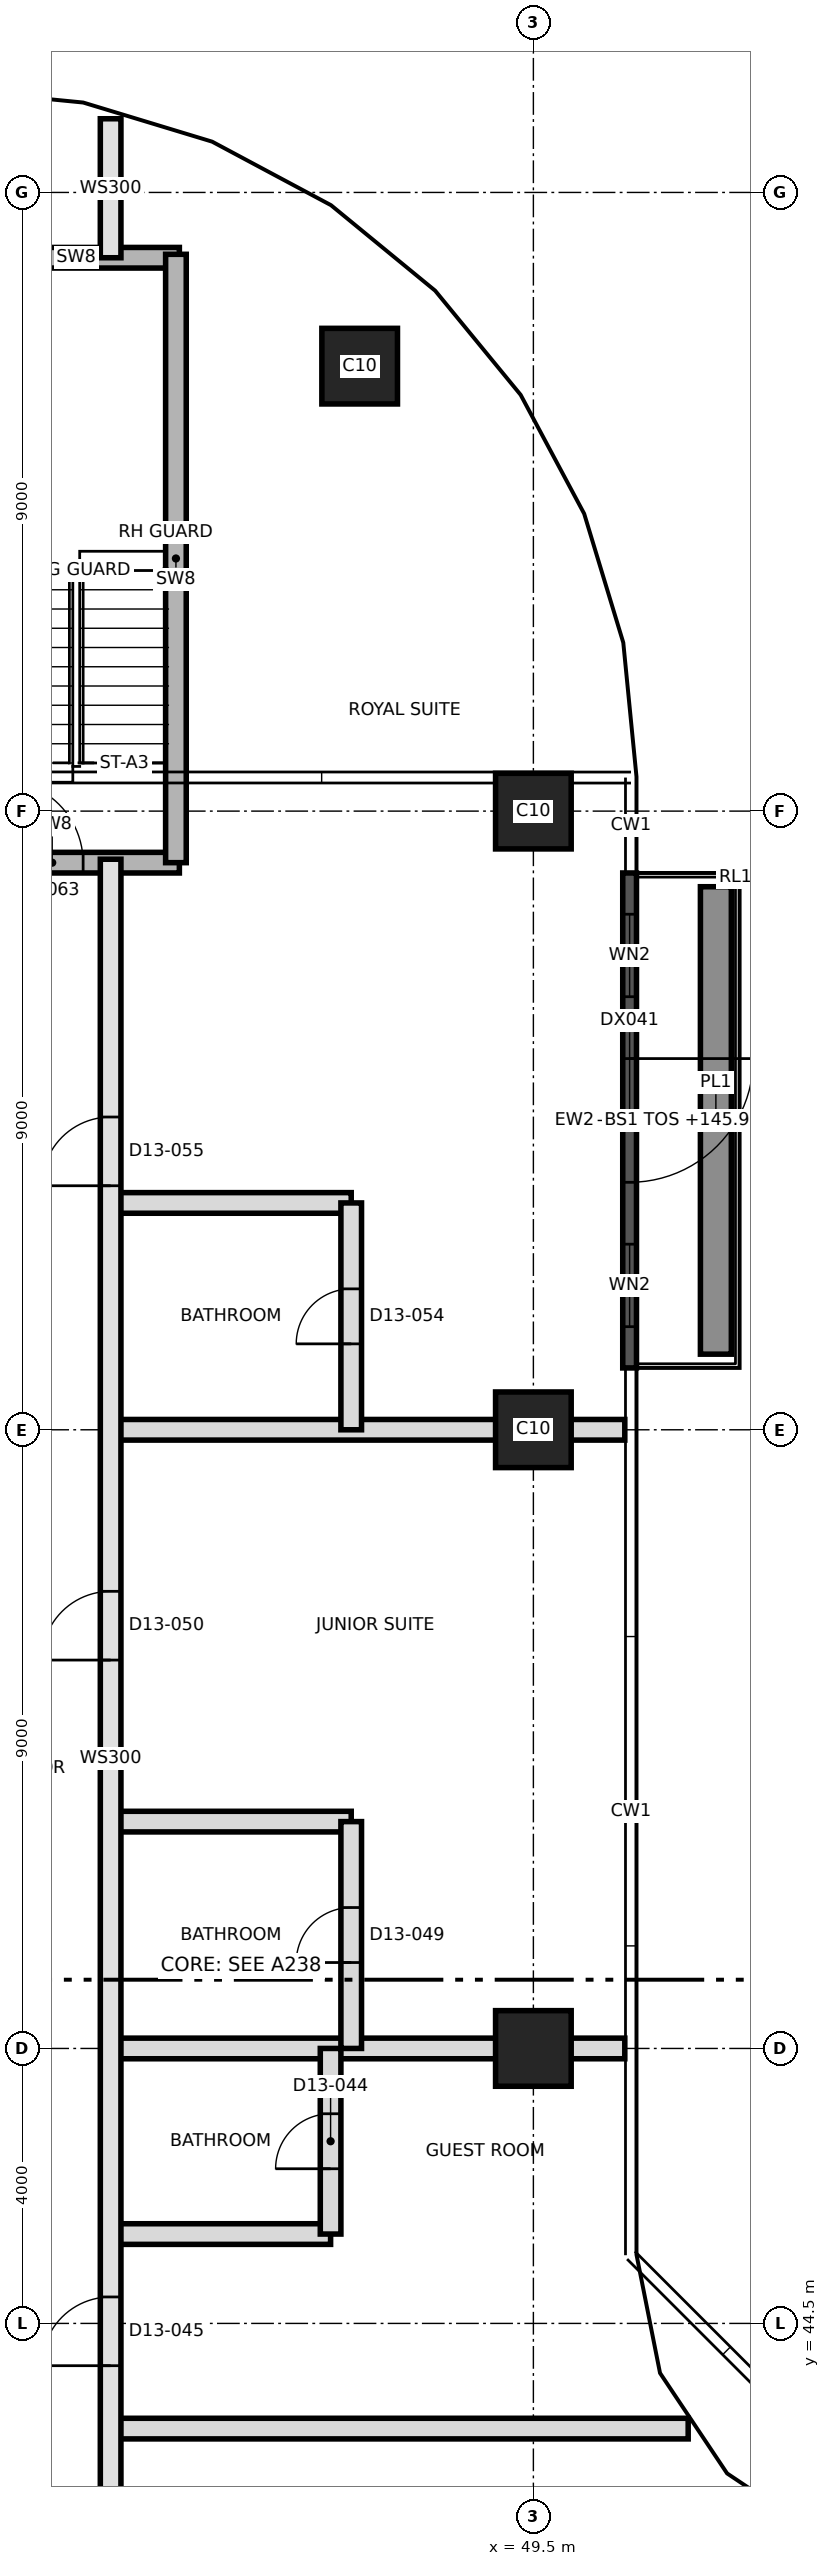
"""IFC4 building model, lengths in metres.
Left out: names, types, materials, properties, quantities, classifications, styles, units other than length and angle.
Written with IfcOpenShell. Run it as: python <this file> out.ifc"""

import sys

from ifc_helpers import new_model, si_unit, direction, frame, frame_2d, origin, origin_2d, place, context, subcontext, project, spatial, rectangle, extrude, element, fill, save


model = new_model("IFC4")
c1 = context("Model", 3, precision=1e-05, world=origin(), true_north=direction((0.0, 1.0)))
c2 = subcontext(c1, "Body", "Model", "MODEL_VIEW")
j1 = project(units=[si_unit("LENGTHUNIT", "METRE"), si_unit("PLANEANGLEUNIT", "RADIAN")], contexts=[c1])
p1 = place(None, origin())
s1 = spatial("IfcSite", under=j1, at=p1, CompositionType="ELEMENT")
p2 = place(p1, origin())
s2 = spatial("IfcBuilding", under=s1, at=p2, CompositionType="ELEMENT")
p3 = place(p2, frame((0.0, 0.0, 145.9)))
s3 = spatial("IfcBuildingStorey", under=s2, at=p3, CompositionType="ELEMENT", Elevation=145.9)
for number, where, z_axis, x_axis in (
    (1, (49.5, 48.5, 0.0), (0.0, 0.0, 1.0), (1.0, 0.0, 0.0)),
    (2, (49.5, 57.5, 0.0), (0.0, 0.0, 1.0), (1.0, 0.0, 0.0)),
    (3, (49.5, 66.5, 0.0), (0.0, 0.0, 1.0), (1.0, 0.0, 0.0)),
    (4, (46.973, 72.973, 0.0), (0.0, 0.0, 1.0), (1.0, 0.0, 0.0)),
):
    element("IfcColumn", number, at=place(p3, frame(where, z_axis=z_axis, x_axis=x_axis)), inside=s3, PredefinedType="COLUMN", context=c2, shape_type="SweptSolid", body=[
        extrude(rectangle(XDim=1.1, YDim=1.1, at=origin_2d()), origin(), (0.0, 0.0, 1.0), 3.7),
    ])
p4 = place(p3, frame((52.155, 62.0, 0.0), z_axis=(0.0, 0.0, 1.0), x_axis=(1.0, 0.0, 0.0)))
e5 = element("IfcWall", 5, at=p4, inside=s3, PredefinedType="SOLIDWALL", context=c2, shape_type="SweptSolid", body=[
    extrude(rectangle(XDim=0.45, YDim=6.8, at=origin_2d()), origin(), (0.0, 0.0, 1.0), 1.0),
])
p5 = place(p3, frame((50.9, 65.6, 0.0), z_axis=(0.0, 0.0, 1.0), x_axis=(0.0, -1.0, 0.0)))
e6 = element("IfcWall", 6, at=p5, inside=s3, PredefinedType="SOLIDWALL", context=c2, shape_type="SweptSolid", body=[
    extrude(rectangle(XDim=7.2, YDim=0.2, at=frame_2d((3.6, 0.0))), origin(), (0.0, 0.0, 1.0), 3.4),
])
p6 = place(p5, frame((2.7, 0.0, 0.0)))
e7 = element("IfcOpeningElement", 7, at=p6, cuts=e6, PredefinedType="OPENING", context=c2, shape_type="SweptSolid", body=[
    extrude(rectangle(XDim=1.8, YDim=2.4, at=frame_2d((0.9, 1.2))), frame((0.0, 0.11, 0.0), z_axis=(0.0, -1.0, 0.0), x_axis=(1.0, 0.0, 0.0)), (0.0, 0.0, 1.0), 0.22),
])
p7 = place(p5, frame((5.4, 0.0, 0.9)))
e8 = element("IfcOpeningElement", 8, at=p7, cuts=e6, PredefinedType="OPENING", context=c2, shape_type="SweptSolid", body=[
    extrude(rectangle(XDim=1.2, YDim=2.1, at=frame_2d((0.6, 1.05))), frame((0.0, 0.11, 0.0), z_axis=(0.0, -1.0, 0.0), x_axis=(1.0, 0.0, 0.0)), (0.0, 0.0, 1.0), 0.22),
])
p8 = place(p5, frame((0.6, 0.0, 0.9)))
e9 = element("IfcOpeningElement", 9, at=p8, cuts=e6, PredefinedType="OPENING", context=c2, shape_type="SweptSolid", body=[
    extrude(rectangle(XDim=1.2, YDim=2.1, at=frame_2d((0.6, 1.05))), frame((0.0, 0.11, 0.0), z_axis=(0.0, -1.0, 0.0), x_axis=(1.0, 0.0, 0.0)), (0.0, 0.0, 1.0), 0.22),
])
p9 = place(p3, frame((43.35, 42.97, 0.0), z_axis=(0.0, 0.0, 1.0), x_axis=(1.0, 0.0, 0.0)))
e10 = element("IfcWall", 10, at=p9, inside=s3, PredefinedType="PARTITIONING", context=c2, shape_type="SweptSolid", body=[
    extrude(rectangle(XDim=8.402, YDim=0.3, at=frame_2d((4.201, 0.0))), origin(), (0.0, 0.0, 1.0), 3.4),
])
p10 = place(p3, frame((43.35, 45.8, 0.0), z_axis=(0.0, 0.0, 1.0), x_axis=(1.0, 0.0, 0.0)))
e11 = element("IfcWall", 11, at=p10, inside=s3, PredefinedType="PARTITIONING", context=c2, shape_type="SweptSolid", body=[
    extrude(rectangle(XDim=3.2, YDim=0.3, at=frame_2d((1.6, 0.0))), origin(), (0.0, 0.0, 1.0), 3.4),
])
p11 = place(p3, frame((43.35, 48.5, 0.0), z_axis=(0.0, 0.0, 1.0), x_axis=(1.0, 0.0, 0.0)))
e12 = element("IfcWall", 12, at=p11, inside=s3, PredefinedType="PARTITIONING", context=c2, shape_type="SweptSolid", body=[
    extrude(rectangle(XDim=7.48, YDim=0.3, at=frame_2d((3.74, 0.0))), origin(), (0.0, 0.0, 1.0), 3.4),
])
p12 = place(p3, frame((43.35, 51.8, 0.0), z_axis=(0.0, 0.0, 1.0), x_axis=(1.0, 0.0, 0.0)))
e13 = element("IfcWall", 13, at=p12, inside=s3, PredefinedType="PARTITIONING", context=c2, shape_type="SweptSolid", body=[
    extrude(rectangle(XDim=3.5, YDim=0.3, at=frame_2d((1.75, 0.0))), origin(), (0.0, 0.0, 1.0), 3.4),
])
p13 = place(p3, frame((43.35, 57.5, 0.0), z_axis=(0.0, 0.0, 1.0), x_axis=(1.0, 0.0, 0.0)))
e14 = element("IfcWall", 14, at=p13, inside=s3, PredefinedType="PARTITIONING", context=c2, shape_type="SweptSolid", body=[
    extrude(rectangle(XDim=7.48, YDim=0.3, at=frame_2d((3.74, 0.0))), origin(), (0.0, 0.0, 1.0), 3.4),
])
p14 = place(p3, frame((43.35, 60.8, 0.0), z_axis=(0.0, 0.0, 1.0), x_axis=(1.0, 0.0, 0.0)))
e15 = element("IfcWall", 15, at=p14, inside=s3, PredefinedType="PARTITIONING", context=c2, shape_type="SweptSolid", body=[
    extrude(rectangle(XDim=3.5, YDim=0.3, at=frame_2d((1.75, 0.0))), origin(), (0.0, 0.0, 1.0), 3.4),
])
p15 = place(p3, frame((40.65, 65.75, 0.0), z_axis=(0.0, 0.0, 1.0), x_axis=(1.0, 0.0, 0.0)))
e16 = element("IfcWall", 16, at=p15, inside=s3, PredefinedType="SHEAR", context=c2, shape_type="SweptSolid", body=[
    extrude(rectangle(XDim=3.7, YDim=0.3, at=frame_2d((1.85, 0.0))), origin(), (0.0, 0.0, 1.0), 3.4),
])
p16 = place(p15, frame((1.1, 0.0, 0.0)))
e17 = element("IfcOpeningElement", 17, at=p16, cuts=e16, PredefinedType="OPENING", context=c2, shape_type="SweptSolid", body=[
    extrude(rectangle(XDim=1.2, YDim=2.1, at=frame_2d((0.6, 1.05))), frame((0.0, 0.16, 0.0), z_axis=(0.0, -1.0, 0.0), x_axis=(1.0, 0.0, 0.0)), (0.0, 0.0, 1.0), 0.32),
])
p17 = place(p3, frame((41.35, 74.55, 0.0), z_axis=(0.0, 0.0, 1.0), x_axis=(1.0, 0.0, 0.0)))
e18 = element("IfcWall", 18, at=p17, inside=s3, PredefinedType="SHEAR", context=c2, shape_type="SweptSolid", body=[
    extrude(rectangle(XDim=3.0, YDim=0.3, at=frame_2d((1.5, 0.0))), origin(), (0.0, 0.0, 1.0), 3.4),
])
p18 = place(p3, frame((43.35, 39.65, 0.0), z_axis=(0.0, 0.0, 1.0), x_axis=(0.0, 1.0, 0.0)))
e19 = element("IfcWall", 19, at=p18, inside=s3, PredefinedType="SOLIDWALL", context=c2, shape_type="SweptSolid", body=[
    extrude(rectangle(XDim=26.15, YDim=0.3, at=frame_2d((13.075, 0.0))), origin(), (0.0, 0.0, 1.0), 3.4),
])
p19 = place(p18, frame((0.985, 0.0, 0.0)))
e20 = element("IfcOpeningElement", 20, at=p19, cuts=e19, PredefinedType="OPENING", context=c2, shape_type="SweptSolid", body=[
    extrude(rectangle(XDim=1.2, YDim=2.1, at=frame_2d((0.6, 1.05))), frame((0.0, 0.16, 0.0), z_axis=(0.0, -1.0, 0.0), x_axis=(1.0, 0.0, 0.0)), (0.0, 0.0, 1.0), 0.32),
])
p20 = place(p18, frame((4.235, 0.0, 0.0)))
e21 = element("IfcOpeningElement", 21, at=p20, cuts=e19, PredefinedType="OPENING", context=c2, shape_type="SweptSolid", body=[
    extrude(rectangle(XDim=1.0, YDim=2.1, at=frame_2d((0.5, 1.05))), frame((0.0, 0.16, 0.0), z_axis=(0.0, -1.0, 0.0), x_axis=(1.0, 0.0, 0.0)), (0.0, 0.0, 1.0), 0.32),
])
p21 = place(p18, frame((14.5, 0.0, 0.0)))
e22 = element("IfcOpeningElement", 22, at=p21, cuts=e19, PredefinedType="OPENING", context=c2, shape_type="SweptSolid", body=[
    extrude(rectangle(XDim=1.0, YDim=2.4, at=frame_2d((0.5, 1.2))), frame((0.0, 0.16, 0.0), z_axis=(0.0, -1.0, 0.0), x_axis=(1.0, 0.0, 0.0)), (0.0, 0.0, 1.0), 0.32),
])
p22 = place(p18, frame((21.4, 0.0, 0.0)))
e23 = element("IfcOpeningElement", 23, at=p22, cuts=e19, PredefinedType="OPENING", context=c2, shape_type="SweptSolid", body=[
    extrude(rectangle(XDim=1.0, YDim=2.4, at=frame_2d((0.5, 1.2))), frame((0.0, 0.16, 0.0), z_axis=(0.0, -1.0, 0.0), x_axis=(1.0, 0.0, 0.0)), (0.0, 0.0, 1.0), 0.32),
])
p23 = place(p3, frame((43.35, 74.55, 0.0), z_axis=(0.0, 0.0, 1.0), x_axis=(0.0, 1.0, 0.0)))
e24 = element("IfcWall", 24, at=p23, inside=s3, PredefinedType="SOLIDWALL", context=c2, shape_type="SweptSolid", body=[
    extrude(rectangle(XDim=2.022, YDim=0.3, at=frame_2d((1.011, 0.0))), origin(), (0.0, 0.0, 1.0), 3.4),
])
p24 = place(p3, frame((44.3, 65.75, 0.0), z_axis=(0.0, 0.0, 1.0), x_axis=(0.0, 1.0, 0.0)))
e25 = element("IfcWall", 25, at=p24, inside=s3, PredefinedType="SHEAR", context=c2, shape_type="SweptSolid", body=[
    extrude(rectangle(XDim=8.85, YDim=0.3, at=frame_2d((4.425, 0.0))), origin(), (0.0, 0.0, 1.0), 3.4),
])
p25 = place(p3, frame((46.55, 45.8, 0.0), z_axis=(0.0, 0.0, 1.0), x_axis=(0.0, 1.0, 0.0)))
e26 = element("IfcWall", 26, at=p25, inside=s3, PredefinedType="PARTITIONING", context=c2, shape_type="SweptSolid", body=[
    extrude(rectangle(XDim=2.7, YDim=0.3, at=frame_2d((1.35, 0.0))), origin(), (0.0, 0.0, 1.0), 3.4),
])
p26 = place(p25, frame((0.95, 0.0, 0.0)))
e27 = element("IfcOpeningElement", 27, at=p26, cuts=e26, PredefinedType="OPENING", context=c2, shape_type="SweptSolid", body=[
    extrude(rectangle(XDim=0.8, YDim=2.1, at=frame_2d((0.4, 1.05))), frame((0.0, 0.16, 0.0), z_axis=(0.0, -1.0, 0.0), x_axis=(1.0, 0.0, 0.0)), (0.0, 0.0, 1.0), 0.32),
])
p27 = place(p3, frame((46.85, 48.5, 0.0), z_axis=(0.0, 0.0, 1.0), x_axis=(0.0, 1.0, 0.0)))
e28 = element("IfcWall", 28, at=p27, inside=s3, PredefinedType="PARTITIONING", context=c2, shape_type="SweptSolid", body=[
    extrude(rectangle(XDim=3.3, YDim=0.3, at=frame_2d((1.65, 0.0))), origin(), (0.0, 0.0, 1.0), 3.4),
])
p28 = place(p27, frame((1.25, 0.0, 0.0)))
e29 = element("IfcOpeningElement", 29, at=p28, cuts=e28, PredefinedType="OPENING", context=c2, shape_type="SweptSolid", body=[
    extrude(rectangle(XDim=0.8, YDim=2.1, at=frame_2d((0.4, 1.05))), frame((0.0, 0.16, 0.0), z_axis=(0.0, -1.0, 0.0), x_axis=(1.0, 0.0, 0.0)), (0.0, 0.0, 1.0), 0.32),
])
p29 = place(p3, frame((46.85, 57.5, 0.0), z_axis=(0.0, 0.0, 1.0), x_axis=(0.0, 1.0, 0.0)))
e30 = element("IfcWall", 30, at=p29, inside=s3, PredefinedType="PARTITIONING", context=c2, shape_type="SweptSolid", body=[
    extrude(rectangle(XDim=3.3, YDim=0.3, at=frame_2d((1.65, 0.0))), origin(), (0.0, 0.0, 1.0), 3.4),
])
p30 = place(p29, frame((1.25, 0.0, 0.0)))
e31 = element("IfcOpeningElement", 31, at=p30, cuts=e30, PredefinedType="OPENING", context=c2, shape_type="SweptSolid", body=[
    extrude(rectangle(XDim=0.8, YDim=2.1, at=frame_2d((0.4, 1.05))), frame((0.0, 0.16, 0.0), z_axis=(0.0, -1.0, 0.0), x_axis=(1.0, 0.0, 0.0)), (0.0, 0.0, 1.0), 0.32),
])
p31 = place(p6, origin())
e32 = element("IfcDoor", 32, at=p31, inside=s3, OperationType="SINGLE_SWING_LEFT", PredefinedType="DOOR", context=c2, shape_type="SweptSolid", body=[
    extrude(rectangle(XDim=1.8, YDim=2.4, at=frame_2d((0.9, 1.2))), frame((0.0, 0.025, 0.0), z_axis=(0.0, -1.0, 0.0), x_axis=(1.0, 0.0, 0.0)), (0.0, 0.0, 1.0), 0.05),
])
fill(e7, e32)
p32 = place(p7, origin())
e33 = element("IfcWindow", 33, at=p32, inside=s3, PartitioningType="SINGLE_PANEL", PredefinedType="WINDOW", context=c2, shape_type="SweptSolid", body=[
    extrude(rectangle(XDim=1.2, YDim=2.1, at=frame_2d((0.6, 1.05))), frame((0.0, 0.03, 0.0), z_axis=(0.0, -1.0, 0.0), x_axis=(1.0, 0.0, 0.0)), (0.0, 0.0, 1.0), 0.06),
])
fill(e8, e33)
p33 = place(p8, origin())
e34 = element("IfcWindow", 34, at=p33, inside=s3, PartitioningType="SINGLE_PANEL", PredefinedType="WINDOW", context=c2, shape_type="SweptSolid", body=[
    extrude(rectangle(XDim=1.2, YDim=2.1, at=frame_2d((0.6, 1.05))), frame((0.0, 0.03, 0.0), z_axis=(0.0, -1.0, 0.0), x_axis=(1.0, 0.0, 0.0)), (0.0, 0.0, 1.0), 0.06),
])
fill(e9, e34)
p34 = place(p26, origin())
e35 = element("IfcDoor", 35, at=p34, inside=s3, OperationType="SINGLE_SWING_LEFT", PredefinedType="DOOR", context=c2, shape_type="SweptSolid", body=[
    extrude(rectangle(XDim=0.8, YDim=2.1, at=frame_2d((0.4, 1.05))), frame((0.0, 0.025, 0.0), z_axis=(0.0, -1.0, 0.0), x_axis=(1.0, 0.0, 0.0)), (0.0, 0.0, 1.0), 0.05),
])
fill(e27, e35)
p35 = place(p20, origin())
e36 = element("IfcDoor", 36, at=p35, inside=s3, OperationType="SINGLE_SWING_LEFT", PredefinedType="DOOR", context=c2, shape_type="SweptSolid", body=[
    extrude(rectangle(XDim=1.0, YDim=2.1, at=frame_2d((0.5, 1.05))), frame((0.0, 0.025, 0.0), z_axis=(0.0, -1.0, 0.0), x_axis=(1.0, 0.0, 0.0)), (0.0, 0.0, 1.0), 0.05),
])
fill(e21, e36)
p36 = place(p28, origin())
e37 = element("IfcDoor", 37, at=p36, inside=s3, OperationType="SINGLE_SWING_LEFT", PredefinedType="DOOR", context=c2, shape_type="SweptSolid", body=[
    extrude(rectangle(XDim=0.8, YDim=2.1, at=frame_2d((0.4, 1.05))), frame((0.0, 0.025, 0.0), z_axis=(0.0, -1.0, 0.0), x_axis=(1.0, 0.0, 0.0)), (0.0, 0.0, 1.0), 0.05),
])
fill(e29, e37)
p37 = place(p21, origin())
e38 = element("IfcDoor", 38, at=p37, inside=s3, OperationType="SINGLE_SWING_RIGHT", PredefinedType="DOOR", context=c2, shape_type="SweptSolid", body=[
    extrude(rectangle(XDim=1.0, YDim=2.4, at=frame_2d((0.5, 1.2))), frame((0.0, 0.025, 0.0), z_axis=(0.0, -1.0, 0.0), x_axis=(1.0, 0.0, 0.0)), (0.0, 0.0, 1.0), 0.05),
])
fill(e22, e38)
p38 = place(p30, origin())
e39 = element("IfcDoor", 39, at=p38, inside=s3, OperationType="SINGLE_SWING_RIGHT", PredefinedType="DOOR", context=c2, shape_type="SweptSolid", body=[
    extrude(rectangle(XDim=0.8, YDim=2.1, at=frame_2d((0.4, 1.05))), frame((0.0, 0.025, 0.0), z_axis=(0.0, -1.0, 0.0), x_axis=(1.0, 0.0, 0.0)), (0.0, 0.0, 1.0), 0.05),
])
fill(e31, e39)
p39 = place(p22, origin())
e40 = element("IfcDoor", 40, at=p39, inside=s3, OperationType="SINGLE_SWING_LEFT", PredefinedType="DOOR", context=c2, shape_type="SweptSolid", body=[
    extrude(rectangle(XDim=1.0, YDim=2.4, at=frame_2d((0.5, 1.2))), frame((0.0, 0.025, 0.0), z_axis=(0.0, -1.0, 0.0), x_axis=(1.0, 0.0, 0.0)), (0.0, 0.0, 1.0), 0.05),
])
fill(e23, e40)
p40 = place(p16, origin())
e41 = element("IfcDoor", 41, at=p40, inside=s3, OperationType="SINGLE_SWING_RIGHT", PredefinedType="DOOR", context=c2, shape_type="SweptSolid", body=[
    extrude(rectangle(XDim=1.2, YDim=2.1, at=frame_2d((0.6, 1.05))), frame((0.0, 0.025, 0.0), z_axis=(0.0, -1.0, 0.0), x_axis=(1.0, 0.0, 0.0)), (0.0, 0.0, 1.0), 0.05),
])
fill(e17, e41)
save(model, sys.argv[1])
